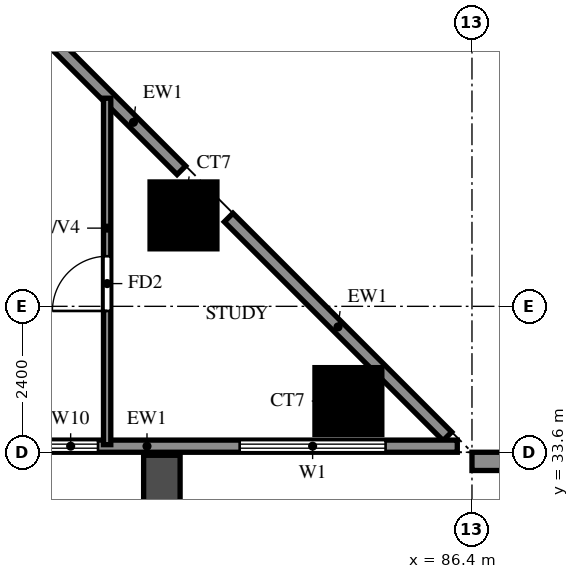
"""IFC4 building model, lengths in metres.
Left out: names, types, materials, properties, quantities, classifications, styles, units other than length and angle.
Written with IfcOpenShell. Run it as: python <this file> out.ifc"""

import sys

from ifc_helpers import new_model, si_unit, direction, frame, frame_2d, origin, origin_2d, place, context, subcontext, project, spatial, rectangle, extrude, source, transform, mapped, element, fill, save


model = new_model("IFC4")
c1 = context("Model", 3, precision=1e-05, world=origin(), true_north=direction((0.0, 1.0)))
c2 = subcontext(c1, "Body", "Model", "MODEL_VIEW")
j1 = project(units=[si_unit("LENGTHUNIT", "METRE"), si_unit("PLANEANGLEUNIT", "RADIAN")], contexts=[c1])
p1 = place(None, origin())
s1 = spatial("IfcSite", under=j1, at=p1, CompositionType="ELEMENT")
p2 = place(p1, origin())
s2 = spatial("IfcBuilding", under=s1, at=p2, CompositionType="ELEMENT")
p3 = place(p2, frame((0.0, 0.0, 37.5)))
s3 = spatial("IfcBuildingStorey", under=s2, at=p3, CompositionType="ELEMENT", Elevation=37.5)
m1 = source(origin(), c2, "Body", "SweptSolid", [
    extrude(rectangle(XDim=1.1, YDim=1.1, at=origin_2d()), origin(), (0.0, 0.0, 1.0), 3.18),
])
for number, where, z_axis, x_axis in (
    (1, (84.367, 34.442, 0.0), (0.0, 0.0, 1.0), (1.0, 0.0, 0.0)),
    (2, (81.656, 37.496, 0.0), (0.0, 0.0, 1.0), (1.0, 0.0, 0.0)),
):
    element("IfcColumn", number, at=place(p3, frame(where, z_axis=z_axis, x_axis=x_axis)), inside=s3, PredefinedType="COLUMN", context=c2, shape_type="MappedRepresentation", body=[
        mapped(m1, transform((0.0, 0.0, 0.0))),
    ])
p4 = place(p3, frame((85.996, 33.863, 0.0), z_axis=(0.0, 0.0, 1.0), x_axis=(-0.7070827891, 0.707130772459, 0.0)))
e3 = element("IfcWall", 3, at=p4, inside=s3, PredefinedType="SOLIDWALL", context=c2, shape_type="SweptSolid", body=[
    extrude(rectangle(XDim=5.088, YDim=0.2, at=frame_2d((2.544, 0.0))), origin(), (0.0, 0.0, 1.0), 3.18),
])
p5 = place(p3, frame((81.62, 38.238, 0.0), z_axis=(0.0, 0.0, 1.0), x_axis=(-0.707106781187, 0.707106781187, 0.0)))
e4 = element("IfcWall", 4, at=p5, inside=s3, PredefinedType="SOLIDWALL", context=c2, shape_type="SweptSolid", body=[
    extrude(rectangle(XDim=2.973, YDim=0.2, at=frame_2d((1.486, 0.0))), origin(), (0.0, 0.0, 1.0), 3.18),
])
p6 = place(p3, frame((72.55, 33.7, 0.0), z_axis=(0.0, 0.0, 1.0), x_axis=(1.0, 0.0, 0.0)))
e5 = element("IfcWall", 5, at=p6, inside=s3, PredefinedType="SOLIDWALL", context=c2, shape_type="SweptSolid", body=[
    extrude(rectangle(XDim=13.609, YDim=0.2, at=frame_2d((6.804, 0.0))), origin(), (0.0, 0.0, 1.0), 3.18),
])
p7 = place(p6, frame((4.55, 0.0, 0.0)))
e6 = element("IfcOpeningElement", 6, at=p7, cuts=e5, PredefinedType="OPENING", context=c2, shape_type="SweptSolid", body=[
    extrude(rectangle(XDim=1.8, YDim=2.4, at=frame_2d((0.9, 1.2))), frame((0.0, 0.11, 0.0), z_axis=(0.0, -1.0, 0.0), x_axis=(1.0, 0.0, 0.0)), (0.0, 0.0, 1.0), 0.22),
])
p8 = place(p6, frame((0.425, 0.0, 0.6)))
e7 = element("IfcOpeningElement", 7, at=p8, cuts=e5, PredefinedType="OPENING", context=c2, shape_type="SweptSolid", body=[
    extrude(rectangle(XDim=1.2, YDim=2.4, at=frame_2d((0.6, 1.2))), frame((0.0, 0.11, 0.0), z_axis=(0.0, -1.0, 0.0), x_axis=(1.0, 0.0, 0.0)), (0.0, 0.0, 1.0), 0.22),
])
p9 = place(p6, frame((2.75, 0.0, 0.6)))
e8 = element("IfcOpeningElement", 8, at=p9, cuts=e5, PredefinedType="OPENING", context=c2, shape_type="SweptSolid", body=[
    extrude(rectangle(XDim=1.2, YDim=2.4, at=frame_2d((0.6, 1.2))), frame((0.0, 0.11, 0.0), z_axis=(0.0, -1.0, 0.0), x_axis=(1.0, 0.0, 0.0)), (0.0, 0.0, 1.0), 0.22),
])
p10 = place(p6, frame((6.8, 0.0, 0.6)))
e9 = element("IfcOpeningElement", 9, at=p10, cuts=e5, PredefinedType="OPENING", context=c2, shape_type="SweptSolid", body=[
    extrude(rectangle(XDim=0.9, YDim=2.4, at=frame_2d((0.45, 1.2))), frame((0.0, 0.11, 0.0), z_axis=(0.0, -1.0, 0.0), x_axis=(1.0, 0.0, 0.0)), (0.0, 0.0, 1.0), 0.22),
])
p11 = place(p6, frame((10.029, 0.0, 0.6)))
e10 = element("IfcOpeningElement", 10, at=p11, cuts=e5, PredefinedType="OPENING", context=c2, shape_type="SweptSolid", body=[
    extrude(rectangle(XDim=2.4, YDim=2.4, at=frame_2d((1.2, 1.2))), frame((0.0, 0.11, 0.0), z_axis=(0.0, -1.0, 0.0), x_axis=(1.0, 0.0, 0.0)), (0.0, 0.0, 1.0), 0.22),
])
p12 = place(p3, frame((86.4, 33.45, -0.32), z_axis=(0.0, 0.0, 1.0), x_axis=(1.0, 0.0, 0.0)))
e11 = element("IfcWall", 11, at=p12, inside=s3, PredefinedType="SOLIDWALL", context=c2, shape_type="SweptSolid", body=[
    extrude(rectangle(XDim=2.4, YDim=0.3, at=frame_2d((1.2, 0.0))), origin(), (0.0, 0.0, 1.0), 3.5),
])
p13 = place(p3, frame((81.3, 33.55, 0.0), z_axis=(0.0, 0.0, 1.0), x_axis=(0.0, -1.0, 0.0)))
e12 = element("IfcWall", 12, at=p13, inside=s3, PredefinedType="SOLIDWALL", context=c2, shape_type="SweptSolid", body=[
    extrude(rectangle(XDim=2.65, YDim=0.6, at=frame_2d((1.325, 0.0))), origin(), (0.0, 0.0, 1.0), 2.85),
])
p14 = place(p3, frame((80.4, 33.725, 0.0), z_axis=(0.0, 0.0, 1.0), x_axis=(0.0, 1.0, 0.0)))
e13 = element("IfcWall", 13, at=p14, inside=s3, PredefinedType="PARTITIONING", context=c2, shape_type="SweptSolid", body=[
    extrude(rectangle(XDim=5.698, YDim=0.12, at=frame_2d((2.849, 0.0))), origin(), (0.0, 0.0, 1.0), 2.28),
])
p15 = place(p14, frame((2.199, 0.0, 0.0)))
e14 = element("IfcOpeningElement", 14, at=p15, cuts=e13, PredefinedType="OPENING", context=c2, shape_type="SweptSolid", body=[
    extrude(rectangle(XDim=0.9, YDim=2.1, at=frame_2d((0.45, 1.05))), frame((0.0, 0.07, 0.0), z_axis=(0.0, -1.0, 0.0), x_axis=(1.0, 0.0, 0.0)), (0.0, 0.0, 1.0), 0.14),
])
p16 = place(p10, origin())
e15 = element("IfcWindow", 15, at=p16, inside=s3, PartitioningType="SINGLE_PANEL", PredefinedType="WINDOW", context=c2, shape_type="SweptSolid", body=[
    extrude(rectangle(XDim=0.9, YDim=2.4, at=frame_2d((0.45, 1.2))), frame((0.0, 0.03, 0.0), z_axis=(0.0, -1.0, 0.0), x_axis=(1.0, 0.0, 0.0)), (0.0, 0.0, 1.0), 0.06),
])
fill(e9, e15)
p17 = place(p11, origin())
e16 = element("IfcWindow", 16, at=p17, inside=s3, PartitioningType="DOUBLE_PANEL_VERTICAL", PredefinedType="WINDOW", context=c2, shape_type="SweptSolid", body=[
    extrude(rectangle(XDim=2.4, YDim=2.4, at=frame_2d((1.2, 1.2))), frame((0.0, 0.03, 0.0), z_axis=(0.0, -1.0, 0.0), x_axis=(1.0, 0.0, 0.0)), (0.0, 0.0, 1.0), 0.06),
])
fill(e10, e16)
p18 = place(p15, origin())
e17 = element("IfcDoor", 17, at=p18, inside=s3, OperationType="SINGLE_SWING_RIGHT", PredefinedType="DOOR", context=c2, shape_type="SweptSolid", body=[
    extrude(rectangle(XDim=0.9, YDim=2.1, at=frame_2d((0.45, 1.05))), frame((0.0, 0.025, 0.0), z_axis=(0.0, -1.0, 0.0), x_axis=(1.0, 0.0, 0.0)), (0.0, 0.0, 1.0), 0.05),
])
fill(e14, e17)
save(model, sys.argv[1])
